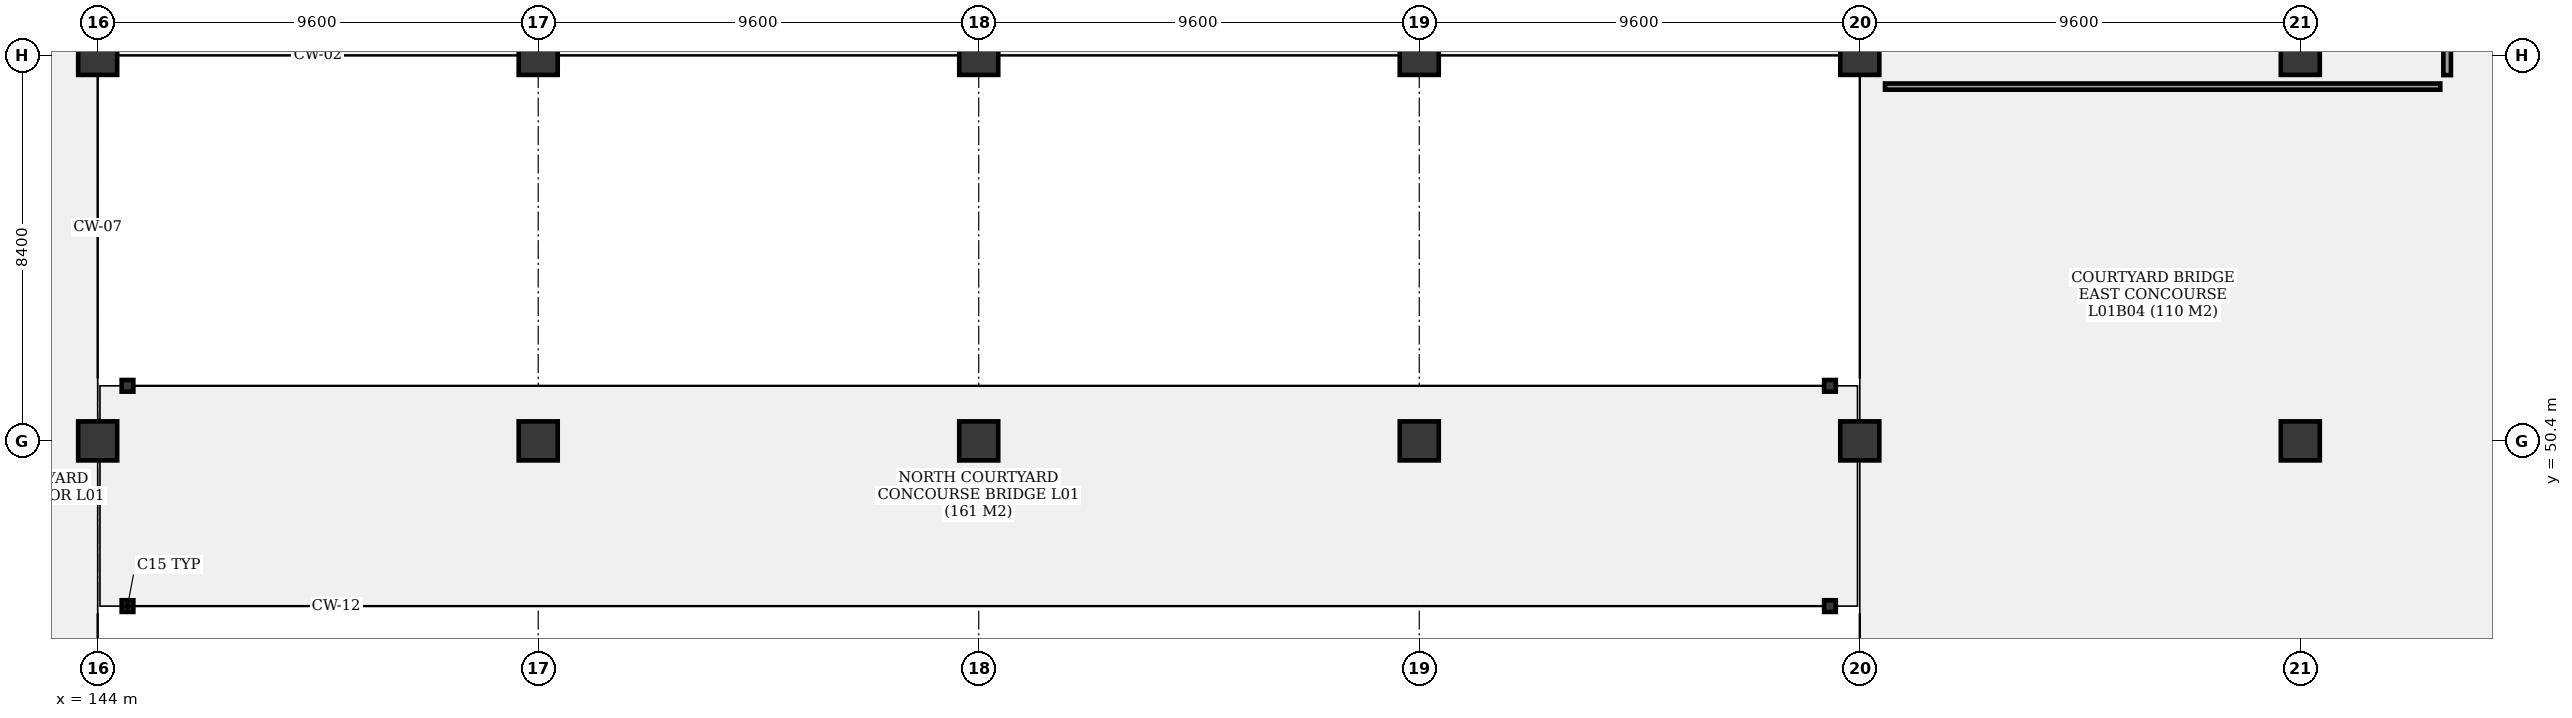
"""IFC4 building model, lengths in metres.
Left out: names, types, materials, properties, quantities, classifications, styles, units other than length and angle.
Written with IfcOpenShell. Run it as: python <this file> out.ifc"""

import sys

from ifc_helpers import new_model, si_unit, direction, frame, frame_2d, origin, origin_2d, place, context, subcontext, project, spatial, rectangle, hollow_rectangle, extrude, element, save


model = new_model("IFC4")
c1 = context("Model", 3, precision=1e-05, world=origin(), true_north=direction((0.0, 1.0)))
c2 = subcontext(c1, "Body", "Model", "MODEL_VIEW")
j1 = project(units=[si_unit("LENGTHUNIT", "METRE"), si_unit("PLANEANGLEUNIT", "RADIAN")], contexts=[c1])
p1 = place(None, origin())
s1 = spatial("IfcSite", under=j1, at=p1, CompositionType="ELEMENT")
p2 = place(p1, origin())
s2 = spatial("IfcBuilding", under=s1, at=p2, CompositionType="ELEMENT")
p3 = place(p2, frame((0.0, 0.0, 5.1)))
s3 = spatial("IfcBuildingStorey", under=s2, at=p3, CompositionType="ELEMENT", Elevation=5.1)
for number, where, z_axis, x_axis in (
    (1, (144.0, 50.4, 0.0), (0.0, 0.0, 1.0), (1.0, 0.0, 0.0)),
    (2, (144.0, 58.8, 0.0), (0.0, 0.0, 1.0), (1.0, 0.0, 0.0)),
):
    element("IfcColumn", number, at=place(p3, frame(where, z_axis=z_axis, x_axis=x_axis)), inside=s3, PredefinedType="COLUMN", context=c2, shape_type="SweptSolid", body=[
        extrude(rectangle(XDim=0.85, YDim=0.85, at=origin_2d()), origin(), (0.0, 0.0, 1.0), 4.8),
    ])
for number, where, z_axis, x_axis in (
    (3, (144.65, 46.8, 0.0), (0.0, 0.0, 1.0), (1.0, 0.0, 0.0)),
    (4, (144.65, 51.6, 0.0), (0.0, 0.0, 1.0), (1.0, 0.0, 0.0)),
):
    element("IfcColumn", number, at=place(p3, frame(where, z_axis=z_axis, x_axis=x_axis)), inside=s3, PredefinedType="COLUMN", context=c2, shape_type="SweptSolid", body=[
        extrude(hollow_rectangle(XDim=0.254, YDim=0.254, WallThickness=0.013, at=origin_2d()), origin(), (0.0, 0.0, 1.0), 4.8),
    ])
for number, where, z_axis, x_axis in (
    (5, (153.6, 50.4, 0.0), (0.0, 0.0, 1.0), (1.0, 0.0, 0.0)),
    (6, (153.6, 58.8, 0.0), (0.0, 0.0, 1.0), (1.0, 0.0, 0.0)),
    (7, (163.2, 50.4, 0.0), (0.0, 0.0, 1.0), (1.0, 0.0, 0.0)),
    (8, (163.2, 58.8, 0.0), (0.0, 0.0, 1.0), (1.0, 0.0, 0.0)),
    (9, (172.8, 50.4, 0.0), (0.0, 0.0, 1.0), (1.0, 0.0, 0.0)),
    (10, (172.8, 58.8, 0.0), (0.0, 0.0, 1.0), (1.0, 0.0, 0.0)),
):
    element("IfcColumn", number, at=place(p3, frame(where, z_axis=z_axis, x_axis=x_axis)), inside=s3, PredefinedType="COLUMN", context=c2, shape_type="SweptSolid", body=[
        extrude(rectangle(XDim=0.85, YDim=0.85, at=origin_2d()), origin(), (0.0, 0.0, 1.0), 4.8),
    ])
for number, where, z_axis, x_axis in (
    (11, (181.75, 46.8, 0.0), (0.0, 0.0, 1.0), (1.0, 0.0, 0.0)),
    (12, (181.75, 51.6, 0.0), (0.0, 0.0, 1.0), (1.0, 0.0, 0.0)),
):
    element("IfcColumn", number, at=place(p3, frame(where, z_axis=z_axis, x_axis=x_axis)), inside=s3, PredefinedType="COLUMN", context=c2, shape_type="SweptSolid", body=[
        extrude(hollow_rectangle(XDim=0.254, YDim=0.254, WallThickness=0.013, at=origin_2d()), origin(), (0.0, 0.0, 1.0), 4.8),
    ])
for number, where, z_axis, x_axis in (
    (13, (182.4, 50.4, 0.0), (0.0, 0.0, 1.0), (1.0, 0.0, 0.0)),
    (14, (182.4, 58.8, 0.0), (0.0, 0.0, 1.0), (1.0, 0.0, 0.0)),
    (15, (192.0, 50.4, 0.0), (0.0, 0.0, 1.0), (1.0, 0.0, 0.0)),
    (16, (192.0, 58.8, 0.0), (0.0, 0.0, 1.0), (1.0, 0.0, 0.0)),
):
    element("IfcColumn", number, at=place(p3, frame(where, z_axis=z_axis, x_axis=x_axis)), inside=s3, PredefinedType="COLUMN", context=c2, shape_type="SweptSolid", body=[
        extrude(rectangle(XDim=0.85, YDim=0.85, at=origin_2d()), origin(), (0.0, 0.0, 1.0), 4.8),
    ])
p4 = place(p3, frame((195.2, 58.37, 0.0), z_axis=(0.0, 0.0, 1.0), x_axis=(0.0, 1.0, 0.0)))
e17 = element("IfcWall", 17, at=p4, inside=s3, PredefinedType="PARTITIONING", context=c2, shape_type="SweptSolid", body=[
    extrude(rectangle(XDim=8.58, YDim=0.165, at=frame_2d((4.29, 0.0))), origin(), (0.0, 0.0, 1.0), 3.68),
])
p5 = place(p4, frame((2.45, 0.0, 0.0)))
e18 = element("IfcOpeningElement", 18, at=p5, cuts=e17, PredefinedType="OPENING", context=c2, shape_type="SweptSolid", body=[
    extrude(rectangle(XDim=1.15, YDim=2.2, at=frame_2d((0.575, 1.1))), frame((0.0, 0.093, 0.0), z_axis=(0.0, -1.0, 0.0), x_axis=(1.0, 0.0, 0.0)), (0.0, 0.0, 1.0), 0.185),
])
p6 = place(p3, frame((182.95, 58.12, 0.0), z_axis=(0.0, 0.0, 1.0), x_axis=(1.0, 0.0, 0.0)))
e19 = element("IfcWall", 19, at=p6, inside=s3, PredefinedType="PARTITIONING", context=c2, shape_type="SweptSolid", body=[
    extrude(rectangle(XDim=12.1, YDim=0.135, at=frame_2d((6.05, 0.0))), origin(), (0.0, 0.0, 1.0), 3.68),
])
save(model, sys.argv[1])
